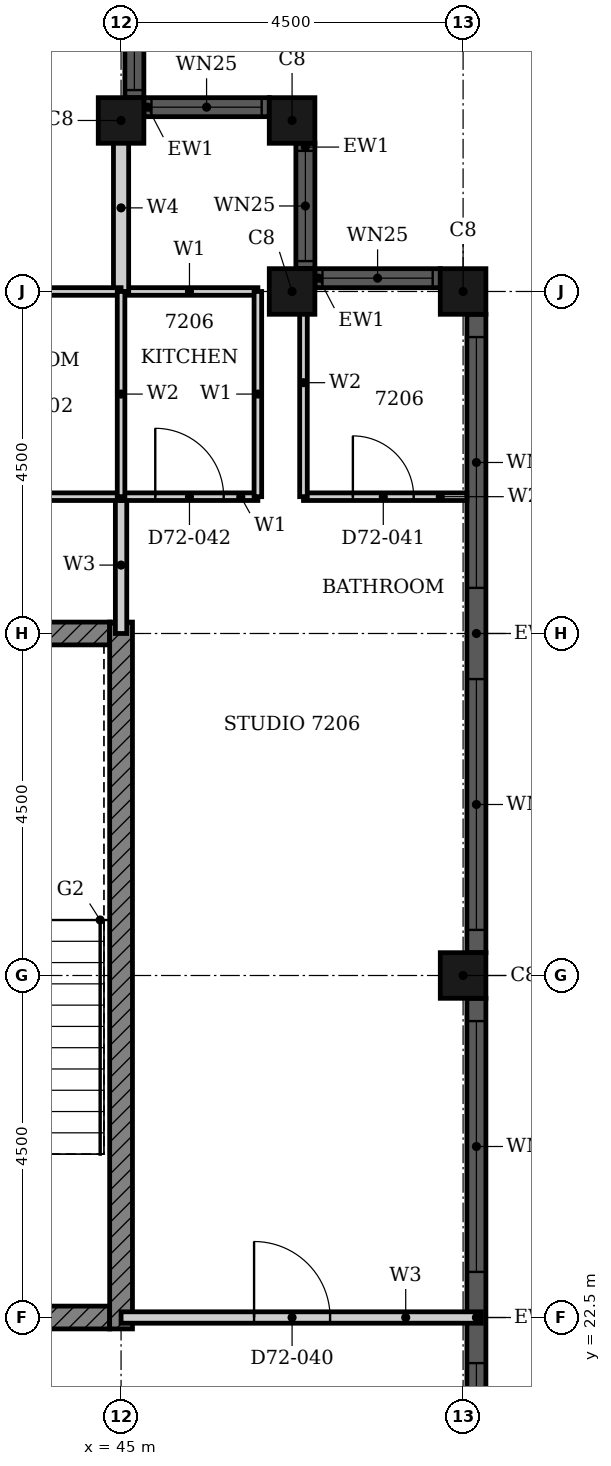
"""IFC4 building model, lengths in metres.
Left out: names, types, materials, properties, quantities, classifications, styles, units other than length and angle.
Written with IfcOpenShell. Run it as: python <this file> out.ifc"""

import sys

from ifc_helpers import new_model, si_unit, direction, frame, frame_2d, origin, origin_2d, place, context, subcontext, project, spatial, rectangle, hollow_rectangle, extrude, element, fill, save


model = new_model("IFC4")
c1 = context("Model", 3, precision=1e-05, world=origin(), true_north=direction((0.0, 1.0)))
c2 = subcontext(c1, "Body", "Model", "MODEL_VIEW")
j1 = project(units=[si_unit("LENGTHUNIT", "METRE"), si_unit("PLANEANGLEUNIT", "RADIAN")], contexts=[c1])
p1 = place(None, origin())
s1 = spatial("IfcSite", under=j1, at=p1, CompositionType="ELEMENT")
p2 = place(p1, origin())
s2 = spatial("IfcBuilding", under=s1, at=p2, CompositionType="ELEMENT")
p3 = place(p2, frame((0.0, 0.0, 283.4)))
s3 = spatial("IfcBuildingStorey", under=s2, at=p3, CompositionType="ELEMENT", Elevation=283.4)
for number, where, z_axis, x_axis in (
    (1, (49.5, 27.0, 0.0), (0.0, 0.0, 1.0), (1.0, 0.0, 0.0)),
    (2, (49.5, 36.0, 0.0), (0.0, 0.0, 1.0), (1.0, 0.0, 0.0)),
    (3, (47.25, 36.0, 0.0), (0.0, 0.0, 1.0), (1.0, 0.0, 0.0)),
    (4, (47.25, 38.25, 0.0), (0.0, 0.0, 1.0), (1.0, 0.0, 0.0)),
    (5, (45.0, 38.25, 0.0), (0.0, 0.0, 1.0), (1.0, 0.0, 0.0)),
):
    element("IfcColumn", number, at=place(p3, frame(where, z_axis=z_axis, x_axis=x_axis)), inside=s3, PredefinedType="COLUMN", context=c2, shape_type="SweptSolid", body=[
        extrude(hollow_rectangle(XDim=0.6, YDim=0.6, WallThickness=0.02, at=origin_2d()), origin(), (0.0, 0.0, 1.0), 3.7),
    ])
p4 = place(p3, frame((49.675, 18.3, 0.0), z_axis=(0.0, 0.0, 1.0), x_axis=(0.0, 1.0, 0.0)))
e6 = element("IfcWall", 6, at=p4, inside=s3, PredefinedType="SOLIDWALL", context=c2, shape_type="SweptSolid", body=[
    extrude(rectangle(XDim=8.4, YDim=0.25, at=frame_2d((4.2, 0.0))), origin(), (0.0, 0.0, 1.0), 3.7),
])
p5 = place(p4, frame((0.3, 0.0, 0.45)))
e7 = element("IfcOpeningElement", 7, at=p5, cuts=e6, PredefinedType="OPENING", context=c2, shape_type="SweptSolid", body=[
    extrude(rectangle(XDim=3.3, YDim=2.3, at=frame_2d((1.65, 1.15))), frame((0.0, 0.135, 0.0), z_axis=(0.0, -1.0, 0.0), x_axis=(1.0, 0.0, 0.0)), (0.0, 0.0, 1.0), 0.27),
])
p6 = place(p4, frame((4.8, 0.0, 0.45)))
e8 = element("IfcOpeningElement", 8, at=p6, cuts=e6, PredefinedType="OPENING", context=c2, shape_type="SweptSolid", body=[
    extrude(rectangle(XDim=3.3, YDim=2.3, at=frame_2d((1.65, 1.15))), frame((0.0, 0.135, 0.0), z_axis=(0.0, -1.0, 0.0), x_axis=(1.0, 0.0, 0.0)), (0.0, 0.0, 1.0), 0.27),
])
p7 = place(p3, frame((49.675, 27.3, 0.0), z_axis=(0.0, 0.0, 1.0), x_axis=(0.0, 1.0, 0.0)))
e9 = element("IfcWall", 9, at=p7, inside=s3, PredefinedType="SOLIDWALL", context=c2, shape_type="SweptSolid", body=[
    extrude(rectangle(XDim=8.4, YDim=0.25, at=frame_2d((4.2, 0.0))), origin(), (0.0, 0.0, 1.0), 3.7),
])
p8 = place(p7, frame((0.3, 0.0, 0.45)))
e10 = element("IfcOpeningElement", 10, at=p8, cuts=e9, PredefinedType="OPENING", context=c2, shape_type="SweptSolid", body=[
    extrude(rectangle(XDim=3.3, YDim=2.3, at=frame_2d((1.65, 1.15))), frame((0.0, 0.135, 0.0), z_axis=(0.0, -1.0, 0.0), x_axis=(1.0, 0.0, 0.0)), (0.0, 0.0, 1.0), 0.27),
])
p9 = place(p7, frame((4.8, 0.0, 0.45)))
e11 = element("IfcOpeningElement", 11, at=p9, cuts=e9, PredefinedType="OPENING", context=c2, shape_type="SweptSolid", body=[
    extrude(rectangle(XDim=3.3, YDim=2.3, at=frame_2d((1.65, 1.15))), frame((0.0, 0.135, 0.0), z_axis=(0.0, -1.0, 0.0), x_axis=(1.0, 0.0, 0.0)), (0.0, 0.0, 1.0), 0.27),
])
p10 = place(p3, frame((49.2, 36.175, 0.0), z_axis=(0.0, 0.0, 1.0), x_axis=(-1.0, 0.0, 0.0)))
e12 = element("IfcWall", 12, at=p10, inside=s3, PredefinedType="SOLIDWALL", context=c2, shape_type="SweptSolid", body=[
    extrude(rectangle(XDim=1.65, YDim=0.25, at=frame_2d((0.825, 0.0))), origin(), (0.0, 0.0, 1.0), 3.7),
])
p11 = place(p10, frame((0.1, 0.0, 0.9)))
e13 = element("IfcOpeningElement", 13, at=p11, cuts=e12, PredefinedType="OPENING", context=c2, shape_type="SweptSolid", body=[
    extrude(rectangle(XDim=1.45, YDim=1.85, at=frame_2d((0.725, 0.925))), frame((0.0, 0.135, 0.0), z_axis=(0.0, -1.0, 0.0), x_axis=(1.0, 0.0, 0.0)), (0.0, 0.0, 1.0), 0.27),
])
p12 = place(p3, frame((47.425, 36.3, 0.0), z_axis=(0.0, 0.0, 1.0), x_axis=(0.0, 1.0, 0.0)))
e14 = element("IfcWall", 14, at=p12, inside=s3, PredefinedType="SOLIDWALL", context=c2, shape_type="SweptSolid", body=[
    extrude(rectangle(XDim=1.65, YDim=0.25, at=frame_2d((0.825, 0.0))), origin(), (0.0, 0.0, 1.0), 3.7),
])
p13 = place(p12, frame((0.1, 0.0, 0.9)))
e15 = element("IfcOpeningElement", 15, at=p13, cuts=e14, PredefinedType="OPENING", context=c2, shape_type="SweptSolid", body=[
    extrude(rectangle(XDim=1.45, YDim=1.85, at=frame_2d((0.725, 0.925))), frame((0.0, 0.135, 0.0), z_axis=(0.0, -1.0, 0.0), x_axis=(1.0, 0.0, 0.0)), (0.0, 0.0, 1.0), 0.27),
])
p14 = place(p3, frame((46.95, 38.425, 0.0), z_axis=(0.0, 0.0, 1.0), x_axis=(-1.0, 0.0, 0.0)))
e16 = element("IfcWall", 16, at=p14, inside=s3, PredefinedType="SOLIDWALL", context=c2, shape_type="SweptSolid", body=[
    extrude(rectangle(XDim=1.65, YDim=0.25, at=frame_2d((0.825, 0.0))), origin(), (0.0, 0.0, 1.0), 3.7),
])
p15 = place(p14, frame((0.1, 0.0, 0.9)))
e17 = element("IfcOpeningElement", 17, at=p15, cuts=e16, PredefinedType="OPENING", context=c2, shape_type="SweptSolid", body=[
    extrude(rectangle(XDim=1.45, YDim=1.85, at=frame_2d((0.725, 0.925))), frame((0.0, 0.135, 0.0), z_axis=(0.0, -1.0, 0.0), x_axis=(1.0, 0.0, 0.0)), (0.0, 0.0, 1.0), 0.27),
])
p16 = place(p3, frame((45.175, 38.55, 0.0), z_axis=(0.0, 0.0, 1.0), x_axis=(0.0, 1.0, 0.0)))
e18 = element("IfcWall", 18, at=p16, inside=s3, PredefinedType="SOLIDWALL", context=c2, shape_type="SweptSolid", body=[
    extrude(rectangle(XDim=1.65, YDim=0.25, at=frame_2d((0.825, 0.0))), origin(), (0.0, 0.0, 1.0), 3.7),
])
p17 = place(p16, frame((0.1, 0.0, 0.9)))
e19 = element("IfcOpeningElement", 19, at=p17, cuts=e18, PredefinedType="OPENING", context=c2, shape_type="SweptSolid", body=[
    extrude(rectangle(XDim=1.45, YDim=1.85, at=frame_2d((0.725, 0.925))), frame((0.0, 0.135, 0.0), z_axis=(0.0, -1.0, 0.0), x_axis=(1.0, 0.0, 0.0)), (0.0, 0.0, 1.0), 0.27),
])
p18 = place(p3, frame((30.339, 22.5, 0.0), z_axis=(0.0, 0.0, 1.0), x_axis=(1.0, 0.0, 0.0)))
e20 = element("IfcWall", 20, at=p18, inside=s3, PredefinedType="SHEAR", context=c2, shape_type="SweptSolid", body=[
    extrude(rectangle(XDim=14.511, YDim=0.3, at=frame_2d((7.255, 0.0))), origin(), (0.0, 0.0, 1.0), 3.4),
])
p19 = place(p18, frame((7.975, 0.0, 0.0)))
e21 = element("IfcOpeningElement", 21, at=p19, cuts=e20, PredefinedType="OPENING", context=c2, shape_type="SweptSolid", body=[
    extrude(rectangle(XDim=1.8, YDim=2.1, at=frame_2d((0.9, 1.05))), frame((0.0, 0.16, 0.0), z_axis=(0.0, -1.0, 0.0), x_axis=(1.0, 0.0, 0.0)), (0.0, 0.0, 1.0), 0.32),
])
p20 = place(p3, frame((40.625, 31.5, 0.0), z_axis=(0.0, 0.0, 1.0), x_axis=(1.0, 0.0, 0.0)))
e22 = element("IfcWall", 22, at=p20, inside=s3, PredefinedType="SHEAR", context=c2, shape_type="SweptSolid", body=[
    extrude(rectangle(XDim=4.225, YDim=0.3, at=frame_2d((2.113, 0.0))), origin(), (0.0, 0.0, 1.0), 3.4),
])
p21 = place(p3, frame((45.0, 22.35, 0.0), z_axis=(0.0, 0.0, 1.0), x_axis=(0.0, 1.0, 0.0)))
e23 = element("IfcWall", 23, at=p21, inside=s3, PredefinedType="SHEAR", context=c2, shape_type="SweptSolid", body=[
    extrude(rectangle(XDim=9.3, YDim=0.3, at=frame_2d((4.65, 0.0))), origin(), (0.0, 0.0, 1.0), 3.4),
])
p22 = place(p3, frame((45.0, 22.5, 0.0), z_axis=(0.0, 0.0, 1.0), x_axis=(1.0, 0.0, 0.0)))
e24 = element("IfcWall", 24, at=p22, inside=s3, PredefinedType="PARTITIONING", context=c2, shape_type="SweptSolid", body=[
    extrude(rectangle(XDim=4.74, YDim=0.15, at=frame_2d((2.37, 0.0))), origin(), (0.0, 0.0, 1.0), 3.4),
])
p23 = place(p22, frame((1.75, 0.0, 0.0)))
e25 = element("IfcOpeningElement", 25, at=p23, cuts=e24, PredefinedType="OPENING", context=c2, shape_type="SweptSolid", body=[
    extrude(rectangle(XDim=1.0, YDim=2.2, at=frame_2d((0.5, 1.1))), frame((0.0, 0.085, 0.0), z_axis=(0.0, -1.0, 0.0), x_axis=(1.0, 0.0, 0.0)), (0.0, 0.0, 1.0), 0.17),
])
p24 = place(p3, frame((45.0, 31.5, 0.0), z_axis=(0.0, 0.0, 1.0), x_axis=(0.0, 1.0, 0.0)))
e26 = element("IfcWall", 26, at=p24, inside=s3, PredefinedType="PARTITIONING", context=c2, shape_type="SweptSolid", body=[
    extrude(rectangle(XDim=1.8, YDim=0.15, at=frame_2d((0.9, 0.0))), origin(), (0.0, 0.0, 1.0), 3.4),
])
p25 = place(p3, frame((45.0, 33.3, 0.0), z_axis=(0.0, 0.0, 1.0), x_axis=(1.0, 0.0, 0.0)))
e27 = element("IfcWall", 27, at=p25, inside=s3, PredefinedType="PARTITIONING", context=c2, shape_type="SweptSolid", body=[
    extrude(rectangle(XDim=1.8, YDim=0.1, at=frame_2d((0.9, 0.0))), origin(), (0.0, 0.0, 1.0), 3.4),
])
p26 = place(p25, frame((0.45, 0.0, 0.0)))
e28 = element("IfcOpeningElement", 28, at=p26, cuts=e27, PredefinedType="OPENING", context=c2, shape_type="SweptSolid", body=[
    extrude(rectangle(XDim=0.9, YDim=2.1, at=frame_2d((0.45, 1.05))), frame((0.0, 0.06, 0.0), z_axis=(0.0, -1.0, 0.0), x_axis=(1.0, 0.0, 0.0)), (0.0, 0.0, 1.0), 0.12),
])
p27 = place(p3, frame((45.0, 36.0, 0.0), z_axis=(0.0, 0.0, 1.0), x_axis=(1.0, 0.0, 0.0)))
e29 = element("IfcWall", 29, at=p27, inside=s3, PredefinedType="PARTITIONING", context=c2, shape_type="SweptSolid", body=[
    extrude(rectangle(XDim=1.8, YDim=0.1, at=frame_2d((0.9, 0.0))), origin(), (0.0, 0.0, 1.0), 3.4),
])
p28 = place(p3, frame((46.8, 33.3, 0.0), z_axis=(0.0, 0.0, 1.0), x_axis=(0.0, 1.0, 0.0)))
e30 = element("IfcWall", 30, at=p28, inside=s3, PredefinedType="PARTITIONING", context=c2, shape_type="SweptSolid", body=[
    extrude(rectangle(XDim=2.7, YDim=0.1, at=frame_2d((1.35, 0.0))), origin(), (0.0, 0.0, 1.0), 3.4),
])
p29 = place(p3, frame((45.0, 36.0, 0.0), z_axis=(0.0, 0.0, 1.0), x_axis=(0.0, 1.0, 0.0)))
e31 = element("IfcWall", 31, at=p29, inside=s3, PredefinedType="PARTITIONING", context=c2, shape_type="SweptSolid", body=[
    extrude(rectangle(XDim=2.2, YDim=0.2, at=frame_2d((1.1, 0.0))), origin(), (0.0, 0.0, 1.0), 3.4),
])
p30 = place(p3, frame((42.0, 33.3, 0.0), z_axis=(0.0, 0.0, 1.0), x_axis=(1.0, 0.0, 0.0)))
e32 = element("IfcWall", 32, at=p30, inside=s3, PredefinedType="PARTITIONING", context=c2, shape_type="SweptSolid", body=[
    extrude(rectangle(XDim=3.0, YDim=0.1, at=frame_2d((1.5, 0.0))), origin(), (0.0, 0.0, 1.0), 3.4),
])
p31 = place(p3, frame((47.4, 33.3, 0.0), z_axis=(0.0, 0.0, 1.0), x_axis=(1.0, 0.0, 0.0)))
e33 = element("IfcWall", 33, at=p31, inside=s3, PredefinedType="PARTITIONING", context=c2, shape_type="SweptSolid", body=[
    extrude(rectangle(XDim=2.15, YDim=0.1, at=frame_2d((1.075, 0.0))), origin(), (0.0, 0.0, 1.0), 3.4),
])
p32 = place(p31, frame((0.65, 0.0, 0.0)))
e34 = element("IfcOpeningElement", 34, at=p32, cuts=e33, PredefinedType="OPENING", context=c2, shape_type="SweptSolid", body=[
    extrude(rectangle(XDim=0.8, YDim=2.1, at=frame_2d((0.4, 1.05))), frame((0.0, 0.06, 0.0), z_axis=(0.0, -1.0, 0.0), x_axis=(1.0, 0.0, 0.0)), (0.0, 0.0, 1.0), 0.12),
])
p33 = place(p3, frame((42.0, 36.0, 0.0), z_axis=(0.0, 0.0, 1.0), x_axis=(1.0, 0.0, 0.0)))
e35 = element("IfcWall", 35, at=p33, inside=s3, PredefinedType="PARTITIONING", context=c2, shape_type="SweptSolid", body=[
    extrude(rectangle(XDim=3.0, YDim=0.1, at=frame_2d((1.5, 0.0))), origin(), (0.0, 0.0, 1.0), 3.4),
])
p34 = place(p3, frame((45.0, 33.3, 0.0), z_axis=(0.0, 0.0, 1.0), x_axis=(0.0, 1.0, 0.0)))
e36 = element("IfcWall", 36, at=p34, inside=s3, PredefinedType="PARTITIONING", context=c2, shape_type="SweptSolid", body=[
    extrude(rectangle(XDim=2.7, YDim=0.1, at=frame_2d((1.35, 0.0))), origin(), (0.0, 0.0, 1.0), 3.4),
])
p35 = place(p3, frame((47.4, 33.3, 0.0), z_axis=(0.0, 0.0, 1.0), x_axis=(0.0, 1.0, 0.0)))
e37 = element("IfcWall", 37, at=p35, inside=s3, PredefinedType="PARTITIONING", context=c2, shape_type="SweptSolid", body=[
    extrude(rectangle(XDim=3.0, YDim=0.1, at=frame_2d((1.5, 0.0))), origin(), (0.0, 0.0, 1.0), 3.4),
])
p36 = place(p5, origin())
e38 = element("IfcWindow", 38, at=p36, inside=s3, PartitioningType="SINGLE_PANEL", PredefinedType="WINDOW", context=c2, shape_type="SweptSolid", body=[
    extrude(rectangle(XDim=3.3, YDim=2.3, at=frame_2d((1.65, 1.15))), frame((0.0, 0.03, 0.0), z_axis=(0.0, -1.0, 0.0), x_axis=(1.0, 0.0, 0.0)), (0.0, 0.0, 1.0), 0.06),
])
fill(e7, e38)
p37 = place(p6, origin())
e39 = element("IfcWindow", 39, at=p37, inside=s3, PartitioningType="SINGLE_PANEL", PredefinedType="WINDOW", context=c2, shape_type="SweptSolid", body=[
    extrude(rectangle(XDim=3.3, YDim=2.3, at=frame_2d((1.65, 1.15))), frame((0.0, 0.03, 0.0), z_axis=(0.0, -1.0, 0.0), x_axis=(1.0, 0.0, 0.0)), (0.0, 0.0, 1.0), 0.06),
])
fill(e8, e39)
p38 = place(p8, origin())
e40 = element("IfcWindow", 40, at=p38, inside=s3, PartitioningType="SINGLE_PANEL", PredefinedType="WINDOW", context=c2, shape_type="SweptSolid", body=[
    extrude(rectangle(XDim=3.3, YDim=2.3, at=frame_2d((1.65, 1.15))), frame((0.0, 0.03, 0.0), z_axis=(0.0, -1.0, 0.0), x_axis=(1.0, 0.0, 0.0)), (0.0, 0.0, 1.0), 0.06),
])
fill(e10, e40)
p39 = place(p9, origin())
e41 = element("IfcWindow", 41, at=p39, inside=s3, PartitioningType="SINGLE_PANEL", PredefinedType="WINDOW", context=c2, shape_type="SweptSolid", body=[
    extrude(rectangle(XDim=3.3, YDim=2.3, at=frame_2d((1.65, 1.15))), frame((0.0, 0.03, 0.0), z_axis=(0.0, -1.0, 0.0), x_axis=(1.0, 0.0, 0.0)), (0.0, 0.0, 1.0), 0.06),
])
fill(e11, e41)
p40 = place(p11, origin())
e42 = element("IfcWindow", 42, at=p40, inside=s3, PartitioningType="SINGLE_PANEL", PredefinedType="WINDOW", context=c2, shape_type="SweptSolid", body=[
    extrude(rectangle(XDim=1.45, YDim=1.85, at=frame_2d((0.725, 0.925))), frame((0.0, 0.03, 0.0), z_axis=(0.0, -1.0, 0.0), x_axis=(1.0, 0.0, 0.0)), (0.0, 0.0, 1.0), 0.06),
])
fill(e13, e42)
p41 = place(p13, origin())
e43 = element("IfcWindow", 43, at=p41, inside=s3, PartitioningType="SINGLE_PANEL", PredefinedType="WINDOW", context=c2, shape_type="SweptSolid", body=[
    extrude(rectangle(XDim=1.45, YDim=1.85, at=frame_2d((0.725, 0.925))), frame((0.0, 0.03, 0.0), z_axis=(0.0, -1.0, 0.0), x_axis=(1.0, 0.0, 0.0)), (0.0, 0.0, 1.0), 0.06),
])
fill(e15, e43)
p42 = place(p15, origin())
e44 = element("IfcWindow", 44, at=p42, inside=s3, PartitioningType="SINGLE_PANEL", PredefinedType="WINDOW", context=c2, shape_type="SweptSolid", body=[
    extrude(rectangle(XDim=1.45, YDim=1.85, at=frame_2d((0.725, 0.925))), frame((0.0, 0.03, 0.0), z_axis=(0.0, -1.0, 0.0), x_axis=(1.0, 0.0, 0.0)), (0.0, 0.0, 1.0), 0.06),
])
fill(e17, e44)
p43 = place(p17, origin())
e45 = element("IfcWindow", 45, at=p43, inside=s3, PartitioningType="SINGLE_PANEL", PredefinedType="WINDOW", context=c2, shape_type="SweptSolid", body=[
    extrude(rectangle(XDim=1.45, YDim=1.85, at=frame_2d((0.725, 0.925))), frame((0.0, 0.03, 0.0), z_axis=(0.0, -1.0, 0.0), x_axis=(1.0, 0.0, 0.0)), (0.0, 0.0, 1.0), 0.06),
])
fill(e19, e45)
p44 = place(p23, origin())
e46 = element("IfcDoor", 46, at=p44, inside=s3, OperationType="SINGLE_SWING_LEFT", PredefinedType="DOOR", context=c2, shape_type="SweptSolid", body=[
    extrude(rectangle(XDim=1.0, YDim=2.2, at=frame_2d((0.5, 1.1))), frame((0.0, 0.025, 0.0), z_axis=(0.0, -1.0, 0.0), x_axis=(1.0, 0.0, 0.0)), (0.0, 0.0, 1.0), 0.05),
])
fill(e25, e46)
p45 = place(p32, origin())
e47 = element("IfcDoor", 47, at=p45, inside=s3, OperationType="SINGLE_SWING_LEFT", PredefinedType="DOOR", context=c2, shape_type="SweptSolid", body=[
    extrude(rectangle(XDim=0.8, YDim=2.1, at=frame_2d((0.4, 1.05))), frame((0.0, 0.025, 0.0), z_axis=(0.0, -1.0, 0.0), x_axis=(1.0, 0.0, 0.0)), (0.0, 0.0, 1.0), 0.05),
])
fill(e34, e47)
p46 = place(p26, origin())
e48 = element("IfcDoor", 48, at=p46, inside=s3, OperationType="SINGLE_SWING_LEFT", PredefinedType="DOOR", context=c2, shape_type="SweptSolid", body=[
    extrude(rectangle(XDim=0.9, YDim=2.1, at=frame_2d((0.45, 1.05))), frame((0.0, 0.025, 0.0), z_axis=(0.0, -1.0, 0.0), x_axis=(1.0, 0.0, 0.0)), (0.0, 0.0, 1.0), 0.05),
])
fill(e28, e48)
save(model, sys.argv[1])
